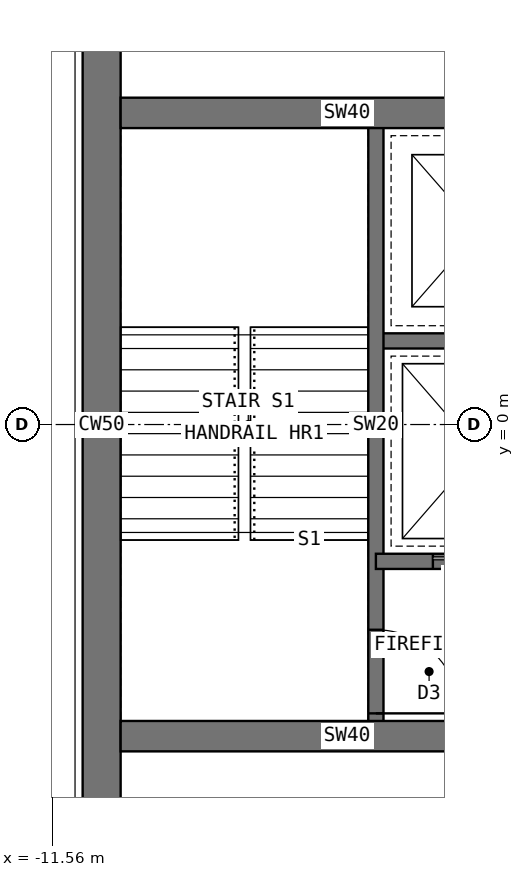
"""IFC4 building model, lengths in metres.
Left out: names, types, materials, properties, quantities, classifications, styles, units other than length and angle.
Written with IfcOpenShell. Run it as: python <this file> out.ifc"""

import sys

from ifc_helpers import new_model, si_unit, direction, frame, frame_2d, origin, place, context, subcontext, project, spatial, rectangle, extrude, element, fill, save


model = new_model("IFC4")
c1 = context("Model", 3, precision=1e-05, world=origin(), true_north=direction((0.0, 1.0)))
c2 = subcontext(c1, "Body", "Model", "MODEL_VIEW")
j1 = project(units=[si_unit("LENGTHUNIT", "METRE"), si_unit("PLANEANGLEUNIT", "RADIAN")], contexts=[c1])
p1 = place(None, origin())
s1 = spatial("IfcSite", under=j1, at=p1, CompositionType="ELEMENT")
p2 = place(p1, origin())
s2 = spatial("IfcBuilding", under=s1, at=p2, CompositionType="ELEMENT")
p3 = place(p2, frame((0.0, 0.0, 186.5)))
s3 = spatial("IfcBuildingStorey", under=s2, at=p3, CompositionType="ELEMENT", Elevation=186.5)
p4 = place(p3, frame((-10.908, 6.298, 0.0), z_axis=(0.0, 0.0, 1.0), x_axis=(0.0, -1.0, 0.0)))
e1 = element("IfcWall", 1, at=p4, inside=s3, PredefinedType="SHEAR", context=c2, shape_type="SweptSolid", body=[
    extrude(rectangle(XDim=12.596, YDim=0.5, at=frame_2d((6.298, 0.0))), origin(), (0.0, 0.0, 1.0), 4.0),
])
p5 = place(p3, frame((-4.7, 1.1, 0.0), z_axis=(0.0, 0.0, 1.0), x_axis=(-1.0, 0.0, 0.0)))
e2 = element("IfcWall", 2, at=p5, inside=s3, PredefinedType="SHEAR", context=c2, shape_type="SweptSolid", body=[
    extrude(rectangle(XDim=2.6, YDim=0.2, at=frame_2d((1.3, 0.0))), origin(), (0.0, 0.0, 1.0), 4.0),
])
p6 = place(p3, frame((-4.7, -1.8, 0.0), z_axis=(0.0, 0.0, 1.0), x_axis=(-1.0, 0.0, 0.0)))
e3 = element("IfcWall", 3, at=p6, inside=s3, PredefinedType="SHEAR", context=c2, shape_type="SweptSolid", body=[
    extrude(rectangle(XDim=2.6, YDim=0.2, at=frame_2d((1.3, 0.0))), origin(), (0.0, 0.0, 1.0), 4.0),
])
p7 = place(p6, frame((0.55, 0.0, 0.0)))
e4 = element("IfcOpeningElement", 4, at=p7, cuts=e3, PredefinedType="OPENING", context=c2, shape_type="SweptSolid", body=[
    extrude(rectangle(XDim=1.3, YDim=2.2, at=frame_2d((0.65, 1.1))), frame((0.0, 0.11, 0.0), z_axis=(0.0, -1.0, 0.0), x_axis=(1.0, 0.0, 0.0)), (0.0, 0.0, 1.0), 0.22),
])
p8 = place(p3, frame((-7.3, 4.0, 0.0), z_axis=(0.0, 0.0, 1.0), x_axis=(0.0, -1.0, 0.0)))
e5 = element("IfcWall", 5, at=p8, inside=s3, PredefinedType="SHEAR", context=c2, shape_type="SweptSolid", body=[
    extrude(rectangle(XDim=8.0, YDim=0.2, at=frame_2d((4.0, 0.0))), origin(), (0.0, 0.0, 1.0), 4.0),
])
p9 = place(p8, frame((6.7, 0.0, 0.0)))
e6 = element("IfcOpeningElement", 6, at=p9, cuts=e5, PredefinedType="OPENING", context=c2, shape_type="SweptSolid", body=[
    extrude(rectangle(XDim=1.1, YDim=2.1, at=frame_2d((0.55, 1.05))), frame((0.0, 0.11, 0.0), z_axis=(0.0, -1.0, 0.0), x_axis=(1.0, 0.0, 0.0)), (0.0, 0.0, 1.0), 0.22),
])
for number, where, z_axis, x_axis in (
    (7, (-4.7, -4.1, 0.0), (0.0, 0.0, 1.0), (-1.0, 0.0, 0.0)),
    (8, (-4.7, 4.1, 0.0), (0.0, 0.0, 1.0), (-1.0, 0.0, 0.0)),
):
    element("IfcWall", number, at=place(p3, frame(where, z_axis=z_axis, x_axis=x_axis)), inside=s3, PredefinedType="SHEAR", context=c2, shape_type="SweptSolid", body=[
        extrude(rectangle(XDim=5.958, YDim=0.4, at=frame_2d((2.979, 0.0))), origin(), (0.0, 0.0, 1.0), 4.0),
    ])
p10 = place(p3, frame((-4.89, 4.27, 0.0), z_axis=(0.0, 0.0, 1.0), x_axis=(-0.500032211057, 0.866006805923, 0.0)))
e9 = element("IfcWall", 9, at=p10, inside=s3, PredefinedType="PARTITIONING", context=c2, shape_type="SweptSolid", body=[
    extrude(rectangle(XDim=4.526, YDim=0.15, at=frame_2d((2.263, 0.0))), origin(), (0.0, 0.0, 1.0), 3.8),
])
p11 = place(p10, frame((2.668, 0.0, 0.0)))
e10 = element("IfcOpeningElement", 10, at=p11, cuts=e9, PredefinedType="OPENING", context=c2, shape_type="SweptSolid", body=[
    extrude(rectangle(XDim=1.0, YDim=2.1, at=frame_2d((0.5, 1.05))), frame((0.0, 0.085, 0.0), z_axis=(0.0, -1.0, 0.0), x_axis=(1.0, 0.0, 0.0)), (0.0, 0.0, 1.0), 0.17),
])
p12 = place(p7, origin())
e11 = element("IfcDoor", 11, at=p12, inside=s3, OperationType="DOUBLE_DOOR_SLIDING", PredefinedType="DOOR", context=c2, shape_type="SweptSolid", body=[
    extrude(rectangle(XDim=1.3, YDim=2.2, at=frame_2d((0.65, 1.1))), frame((0.0, 0.025, 0.0), z_axis=(0.0, -1.0, 0.0), x_axis=(1.0, 0.0, 0.0)), (0.0, 0.0, 1.0), 0.05),
])
fill(e4, e11)
p13 = place(p9, origin())
e12 = element("IfcDoor", 12, at=p13, inside=s3, OperationType="SINGLE_SWING_RIGHT", PredefinedType="DOOR", context=c2, shape_type="SweptSolid", body=[
    extrude(rectangle(XDim=1.1, YDim=2.1, at=frame_2d((0.55, 1.05))), frame((0.0, 0.025, 0.0), z_axis=(0.0, -1.0, 0.0), x_axis=(1.0, 0.0, 0.0)), (0.0, 0.0, 1.0), 0.05),
])
fill(e6, e12)
save(model, sys.argv[1])
